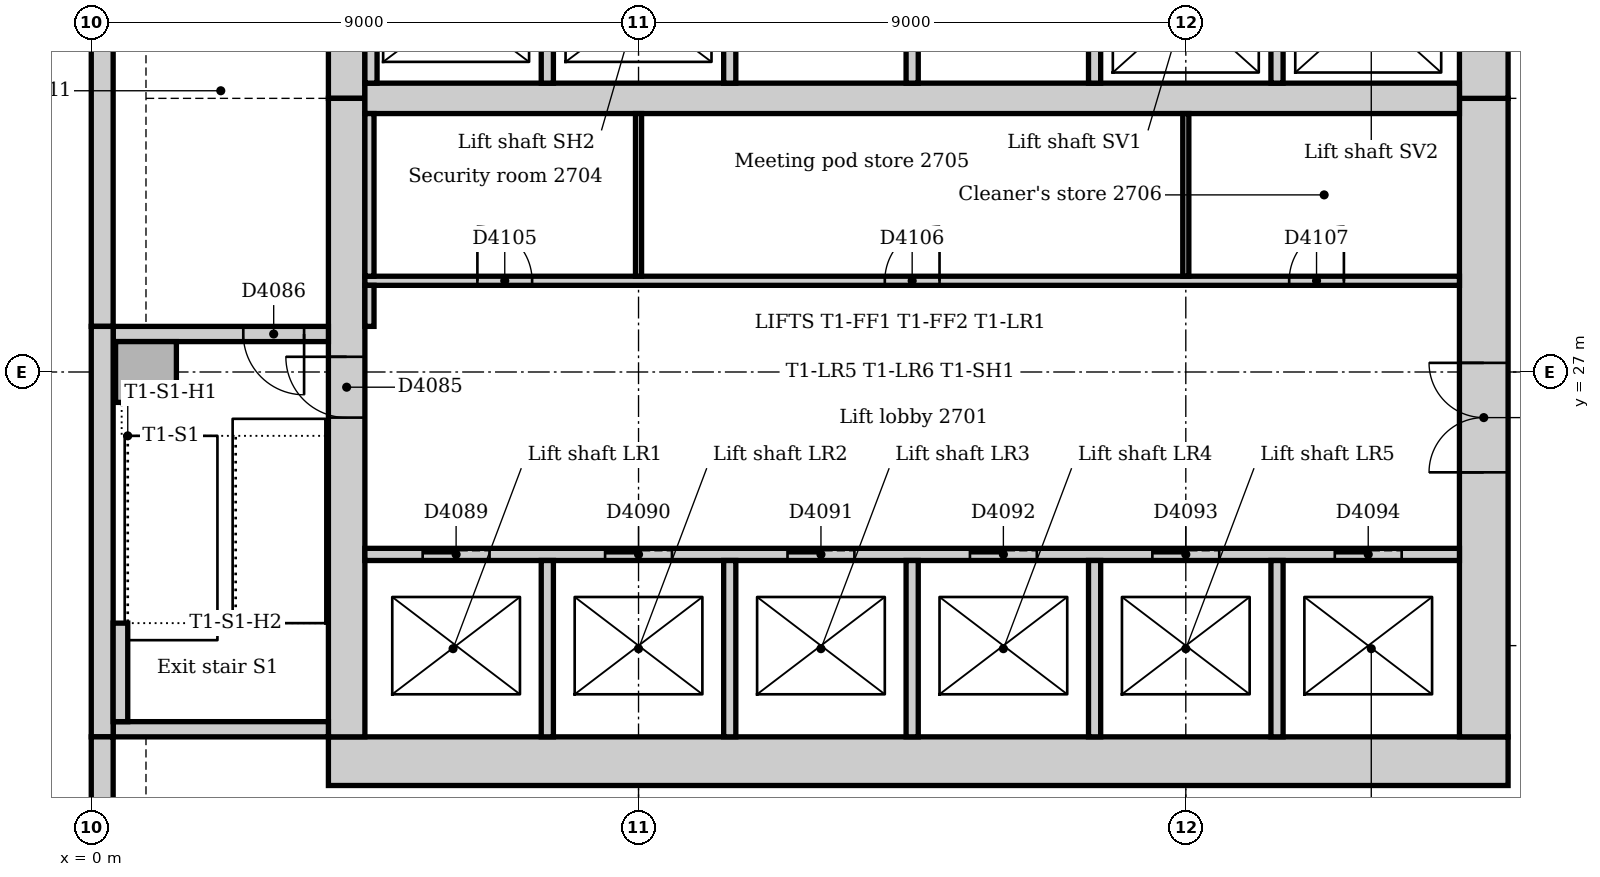
"""IFC4 building model, lengths in metres.
Left out: names, types, materials, properties, quantities, classifications, styles, units other than length and angle.
Written with IfcOpenShell. Run it as: python <this file> out.ifc"""

import sys

from ifc_helpers import new_model, si_unit, direction, frame, frame_2d, origin, origin_2d, place, context, subcontext, project, spatial, rectangle, extrude, element, fill, save


model = new_model("IFC4")
c1 = context("Model", 3, precision=1e-05, world=origin(), true_north=direction((0.0, 1.0)))
c2 = subcontext(c1, "Body", "Model", "MODEL_VIEW")
j1 = project(units=[si_unit("LENGTHUNIT", "METRE"), si_unit("PLANEANGLEUNIT", "RADIAN")], contexts=[c1])
p1 = place(None, origin())
s1 = spatial("IfcSite", under=j1, at=p1, CompositionType="ELEMENT")
p2 = place(p1, origin())
s2 = spatial("IfcBuilding", under=s1, at=p2, CompositionType="ELEMENT")
p3 = place(p2, frame((0.0, 0.0, 116.0)))
s3 = spatial("IfcBuildingStorey", under=s2, at=p3, CompositionType="ELEMENT", Elevation=116.0)
p4 = place(p3, frame((3.9, 20.6, 0.0), z_axis=(0.0, 0.0, 1.0), x_axis=(1.0, 0.0, 0.0)))
e1 = element("IfcWall", 1, at=p4, inside=s3, PredefinedType="SOLIDWALL", context=c2, shape_type="SweptSolid", body=[
    extrude(rectangle(XDim=19.4, YDim=0.8, at=frame_2d((9.7, 0.0))), origin(), (0.0, 0.0, 1.0), 4.0),
])
p5 = place(p3, frame((22.9, 21.0, 0.0), z_axis=(0.0, 0.0, 1.0), x_axis=(0.0, 1.0, 0.0)))
e2 = element("IfcWall", 2, at=p5, inside=s3, PredefinedType="SOLIDWALL", context=c2, shape_type="SweptSolid", body=[
    extrude(rectangle(XDim=10.5, YDim=0.8, at=frame_2d((5.25, 0.0))), origin(), (0.0, 0.0, 1.0), 4.0),
])
p6 = place(p5, frame((4.35, 0.0, 0.0)))
e3 = element("IfcOpeningElement", 3, at=p6, cuts=e2, PredefinedType="OPENING", context=c2, shape_type="SweptSolid", body=[
    extrude(rectangle(XDim=1.8, YDim=2.1, at=frame_2d((0.9, 1.05))), frame((0.0, 0.41, 0.0), z_axis=(0.0, -1.0, 0.0), x_axis=(1.0, 0.0, 0.0)), (0.0, 0.0, 1.0), 0.82),
])
p7 = place(p3, frame((22.9, 31.5, 0.0), z_axis=(0.0, 0.0, 1.0), x_axis=(0.0, 1.0, 0.0)))
e4 = element("IfcWall", 4, at=p7, inside=s3, PredefinedType="SOLIDWALL", context=c2, shape_type="SweptSolid", body=[
    extrude(rectangle(XDim=10.5, YDim=0.8, at=frame_2d((5.25, 0.0))), origin(), (0.0, 0.0, 1.0), 4.0),
])
p8 = place(p7, frame((3.15, 0.0, 0.0)))
e5 = element("IfcOpeningElement", 5, at=p8, cuts=e4, PredefinedType="OPENING", context=c2, shape_type="SweptSolid", body=[
    extrude(rectangle(XDim=1.0, YDim=2.1, at=frame_2d((0.5, 1.05))), frame((0.0, 0.41, 0.0), z_axis=(0.0, -1.0, 0.0), x_axis=(1.0, 0.0, 0.0)), (0.0, 0.0, 1.0), 0.82),
])
p9 = place(p7, frame((5.2, 0.0, 0.0)))
e6 = element("IfcOpeningElement", 6, at=p9, cuts=e4, PredefinedType="OPENING", context=c2, shape_type="SweptSolid", body=[
    extrude(rectangle(XDim=1.0, YDim=2.1, at=frame_2d((0.5, 1.05))), frame((0.0, 0.41, 0.0), z_axis=(0.0, -1.0, 0.0), x_axis=(1.0, 0.0, 0.0)), (0.0, 0.0, 1.0), 0.82),
])
p10 = place(p3, frame((4.2, 42.0, 0.0), z_axis=(0.0, 0.0, 1.0), x_axis=(0.0, -1.0, 0.0)))
e7 = element("IfcWall", 7, at=p10, inside=s3, PredefinedType="SOLIDWALL", context=c2, shape_type="SweptSolid", body=[
    extrude(rectangle(XDim=10.5, YDim=0.6, at=frame_2d((5.25, 0.0))), origin(), (0.0, 0.0, 1.0), 4.0),
])
p11 = place(p10, frame((5.3, 0.0, 0.0)))
e8 = element("IfcOpeningElement", 8, at=p11, cuts=e7, PredefinedType="OPENING", context=c2, shape_type="SweptSolid", body=[
    extrude(rectangle(XDim=1.0, YDim=2.1, at=frame_2d((0.5, 1.05))), frame((0.0, 0.31, 0.0), z_axis=(0.0, -1.0, 0.0), x_axis=(1.0, 0.0, 0.0)), (0.0, 0.0, 1.0), 0.62),
])
p12 = place(p3, frame((4.2, 31.5, 0.0), z_axis=(0.0, 0.0, 1.0), x_axis=(0.0, -1.0, 0.0)))
e9 = element("IfcWall", 9, at=p12, inside=s3, PredefinedType="SOLIDWALL", context=c2, shape_type="SweptSolid", body=[
    extrude(rectangle(XDim=10.5, YDim=0.6, at=frame_2d((5.25, 0.0))), origin(), (0.0, 0.0, 1.0), 4.0),
])
p13 = place(p12, frame((4.25, 0.0, 0.0)))
e10 = element("IfcOpeningElement", 10, at=p13, cuts=e9, PredefinedType="OPENING", context=c2, shape_type="SweptSolid", body=[
    extrude(rectangle(XDim=1.0, YDim=2.1, at=frame_2d((0.5, 1.05))), frame((0.0, 0.31, 0.0), z_axis=(0.0, -1.0, 0.0), x_axis=(1.0, 0.0, 0.0)), (0.0, 0.0, 1.0), 0.62),
])
p14 = place(p3, frame((4.5, 31.5, 0.0), z_axis=(0.0, 0.0, 1.0), x_axis=(1.0, 0.0, 0.0)))
e11 = element("IfcWall", 11, at=p14, inside=s3, PredefinedType="SOLIDWALL", context=c2, shape_type="SweptSolid", body=[
    extrude(rectangle(XDim=18.0, YDim=0.5, at=frame_2d((9.0, 0.0))), origin(), (0.0, 0.0, 1.0), 4.0),
])
p15 = place(p3, frame((0.36, 21.125, 0.0), z_axis=(0.0, 0.0, 1.0), x_axis=(1.0, 0.0, 0.0)))
e12 = element("IfcWall", 12, at=p15, inside=s3, PredefinedType="SOLIDWALL", context=c2, shape_type="SweptSolid", body=[
    extrude(rectangle(XDim=3.54, YDim=0.25, at=frame_2d((1.77, 0.0))), origin(), (0.0, 0.0, 1.0), 4.0),
])
p16 = place(p3, frame((3.9, 27.625, 0.0), z_axis=(0.0, 0.0, 1.0), x_axis=(-1.0, 0.0, 0.0)))
e13 = element("IfcWall", 13, at=p16, inside=s3, PredefinedType="SOLIDWALL", context=c2, shape_type="SweptSolid", body=[
    extrude(rectangle(XDim=3.54, YDim=0.25, at=frame_2d((1.77, 0.0))), origin(), (0.0, 0.0, 1.0), 4.0),
])
p17 = place(p16, frame((0.4, 0.0, 0.0)))
e14 = element("IfcOpeningElement", 14, at=p17, cuts=e13, PredefinedType="OPENING", context=c2, shape_type="SweptSolid", body=[
    extrude(rectangle(XDim=1.0, YDim=2.1, at=frame_2d((0.5, 1.05))), frame((0.0, 0.135, 0.0), z_axis=(0.0, -1.0, 0.0), x_axis=(1.0, 0.0, 0.0)), (0.0, 0.0, 1.0), 0.27),
])
p18 = place(p3, frame((0.9, 27.0, 0.0), z_axis=(0.0, 0.0, 1.0), x_axis=(1.0, 0.0, 0.0)))
e15 = element("IfcColumn", 15, at=p18, inside=s3, PredefinedType="COLUMN", context=c2, shape_type="SweptSolid", body=[
    extrude(rectangle(XDim=1.0, YDim=1.0, at=origin_2d()), origin(), (0.0, 0.0, 1.0), 4.0),
])
p19 = place(p3, frame((0.18, 35.25, 0.0), z_axis=(0.0, 0.0, 1.0), x_axis=(0.0, -1.0, 0.0)))
e16 = element("IfcWall", 16, at=p19, inside=s3, PredefinedType="STANDARD", context=c2, shape_type="SweptSolid", body=[
    extrude(rectangle(XDim=7.5, YDim=0.36, at=frame_2d((3.75, 0.0))), origin(), (0.0, 0.0, 1.0), 3.85),
])
p20 = place(p3, frame((0.18, 27.75, 0.0), z_axis=(0.0, 0.0, 1.0), x_axis=(0.0, -1.0, 0.0)))
e17 = element("IfcWall", 17, at=p20, inside=s3, PredefinedType="STANDARD", context=c2, shape_type="SweptSolid", body=[
    extrude(rectangle(XDim=6.75, YDim=0.36, at=frame_2d((3.375, 0.0))), origin(), (0.0, 0.0, 1.0), 3.85),
])
p21 = place(p3, frame((0.18, 21.0, 0.0), z_axis=(0.0, 0.0, 1.0), x_axis=(0.0, -1.0, 0.0)))
e18 = element("IfcWall", 18, at=p21, inside=s3, PredefinedType="STANDARD", context=c2, shape_type="SweptSolid", body=[
    extrude(rectangle(XDim=12.257, YDim=0.36, at=frame_2d((6.129, 0.0))), origin(), (0.0, 0.0, 1.0), 3.85),
])
p22 = place(p21, frame((1.35, 0.0, 0.9)))
e19 = element("IfcOpeningElement", 19, at=p22, cuts=e18, PredefinedType="OPENING", context=c2, shape_type="SweptSolid", body=[
    extrude(rectangle(XDim=3.3, YDim=1.6, at=frame_2d((1.65, 0.8))), frame((0.0, 0.19, 0.0), z_axis=(0.0, -1.0, 0.0), x_axis=(1.0, 0.0, 0.0)), (0.0, 0.0, 1.0), 0.38),
])
p23 = place(p21, frame((5.85, 0.0, 0.9)))
e20 = element("IfcOpeningElement", 20, at=p23, cuts=e18, PredefinedType="OPENING", context=c2, shape_type="SweptSolid", body=[
    extrude(rectangle(XDim=3.3, YDim=1.6, at=frame_2d((1.65, 0.8))), frame((0.0, 0.19, 0.0), z_axis=(0.0, -1.0, 0.0), x_axis=(1.0, 0.0, 0.0)), (0.0, 0.0, 1.0), 0.38),
])
p24 = place(p3, frame((0.48, 21.25, 0.0), z_axis=(0.0, 0.0, 1.0), x_axis=(0.0, 1.0, 0.0)))
e21 = element("IfcWall", 21, at=p24, inside=s3, PredefinedType="STANDARD", context=c2, shape_type="SweptSolid", body=[
    extrude(rectangle(XDim=1.62, YDim=0.24, at=frame_2d((0.81, 0.0))), origin(), (0.0, 0.0, 1.0), 4.0),
])
p25 = place(p3, frame((4.5, 24.0, 0.0), z_axis=(0.0, 0.0, 1.0), x_axis=(1.0, 0.0, 0.0)))
e22 = element("IfcWall", 22, at=p25, inside=s3, PredefinedType="PARTITIONING", context=c2, shape_type="SweptSolid", body=[
    extrude(rectangle(XDim=18.0, YDim=0.2, at=frame_2d((9.0, 0.0))), origin(), (0.0, 0.0, 1.0), 3.85),
])
p26 = place(p25, frame((0.95, 0.0, 0.0)))
e23 = element("IfcOpeningElement", 23, at=p26, cuts=e22, PredefinedType="OPENING", context=c2, shape_type="SweptSolid", body=[
    extrude(rectangle(XDim=1.1, YDim=2.1, at=frame_2d((0.55, 1.05))), frame((0.0, 0.11, 0.0), z_axis=(0.0, -1.0, 0.0), x_axis=(1.0, 0.0, 0.0)), (0.0, 0.0, 1.0), 0.22),
])
p27 = place(p25, frame((3.95, 0.0, 0.0)))
e24 = element("IfcOpeningElement", 24, at=p27, cuts=e22, PredefinedType="OPENING", context=c2, shape_type="SweptSolid", body=[
    extrude(rectangle(XDim=1.1, YDim=2.1, at=frame_2d((0.55, 1.05))), frame((0.0, 0.11, 0.0), z_axis=(0.0, -1.0, 0.0), x_axis=(1.0, 0.0, 0.0)), (0.0, 0.0, 1.0), 0.22),
])
p28 = place(p25, frame((6.95, 0.0, 0.0)))
e25 = element("IfcOpeningElement", 25, at=p28, cuts=e22, PredefinedType="OPENING", context=c2, shape_type="SweptSolid", body=[
    extrude(rectangle(XDim=1.1, YDim=2.1, at=frame_2d((0.55, 1.05))), frame((0.0, 0.11, 0.0), z_axis=(0.0, -1.0, 0.0), x_axis=(1.0, 0.0, 0.0)), (0.0, 0.0, 1.0), 0.22),
])
p29 = place(p25, frame((9.95, 0.0, 0.0)))
e26 = element("IfcOpeningElement", 26, at=p29, cuts=e22, PredefinedType="OPENING", context=c2, shape_type="SweptSolid", body=[
    extrude(rectangle(XDim=1.1, YDim=2.1, at=frame_2d((0.55, 1.05))), frame((0.0, 0.11, 0.0), z_axis=(0.0, -1.0, 0.0), x_axis=(1.0, 0.0, 0.0)), (0.0, 0.0, 1.0), 0.22),
])
p30 = place(p25, frame((12.95, 0.0, 0.0)))
e27 = element("IfcOpeningElement", 27, at=p30, cuts=e22, PredefinedType="OPENING", context=c2, shape_type="SweptSolid", body=[
    extrude(rectangle(XDim=1.1, YDim=2.1, at=frame_2d((0.55, 1.05))), frame((0.0, 0.11, 0.0), z_axis=(0.0, -1.0, 0.0), x_axis=(1.0, 0.0, 0.0)), (0.0, 0.0, 1.0), 0.22),
])
p31 = place(p25, frame((15.95, 0.0, 0.0)))
e28 = element("IfcOpeningElement", 28, at=p31, cuts=e22, PredefinedType="OPENING", context=c2, shape_type="SweptSolid", body=[
    extrude(rectangle(XDim=1.1, YDim=2.1, at=frame_2d((0.55, 1.05))), frame((0.0, 0.11, 0.0), z_axis=(0.0, -1.0, 0.0), x_axis=(1.0, 0.0, 0.0)), (0.0, 0.0, 1.0), 0.22),
])
p32 = place(p3, frame((4.6, 31.75, 0.0), z_axis=(0.0, 0.0, 1.0), x_axis=(0.0, 1.0, 0.0)))
e29 = element("IfcWall", 29, at=p32, inside=s3, PredefinedType="PARTITIONING", context=c2, shape_type="SweptSolid", body=[
    extrude(rectangle(XDim=2.65, YDim=0.2, at=frame_2d((1.325, 0.0))), origin(), (0.0, 0.0, 1.0), 3.85),
])
p33 = place(p3, frame((7.5, 21.0, 0.0), z_axis=(0.0, 0.0, 1.0), x_axis=(0.0, 1.0, 0.0)))
e30 = element("IfcWall", 30, at=p33, inside=s3, PredefinedType="PARTITIONING", context=c2, shape_type="SweptSolid", body=[
    extrude(rectangle(XDim=2.9, YDim=0.2, at=frame_2d((1.45, 0.0))), origin(), (0.0, 0.0, 1.0), 3.85),
])
p34 = place(p3, frame((7.5, 31.75, 0.0), z_axis=(0.0, 0.0, 1.0), x_axis=(0.0, 1.0, 0.0)))
e31 = element("IfcWall", 31, at=p34, inside=s3, PredefinedType="PARTITIONING", context=c2, shape_type="SweptSolid", body=[
    extrude(rectangle(XDim=2.65, YDim=0.2, at=frame_2d((1.325, 0.0))), origin(), (0.0, 0.0, 1.0), 3.85),
])
p35 = place(p3, frame((10.5, 21.0, 0.0), z_axis=(0.0, 0.0, 1.0), x_axis=(0.0, 1.0, 0.0)))
e32 = element("IfcWall", 32, at=p35, inside=s3, PredefinedType="PARTITIONING", context=c2, shape_type="SweptSolid", body=[
    extrude(rectangle(XDim=2.9, YDim=0.2, at=frame_2d((1.45, 0.0))), origin(), (0.0, 0.0, 1.0), 3.85),
])
p36 = place(p3, frame((10.5, 31.75, 0.0), z_axis=(0.0, 0.0, 1.0), x_axis=(0.0, 1.0, 0.0)))
e33 = element("IfcWall", 33, at=p36, inside=s3, PredefinedType="PARTITIONING", context=c2, shape_type="SweptSolid", body=[
    extrude(rectangle(XDim=2.65, YDim=0.2, at=frame_2d((1.325, 0.0))), origin(), (0.0, 0.0, 1.0), 3.85),
])
p37 = place(p3, frame((13.5, 21.0, 0.0), z_axis=(0.0, 0.0, 1.0), x_axis=(0.0, 1.0, 0.0)))
e34 = element("IfcWall", 34, at=p37, inside=s3, PredefinedType="PARTITIONING", context=c2, shape_type="SweptSolid", body=[
    extrude(rectangle(XDim=2.9, YDim=0.2, at=frame_2d((1.45, 0.0))), origin(), (0.0, 0.0, 1.0), 3.85),
])
p38 = place(p3, frame((13.5, 31.75, 0.0), z_axis=(0.0, 0.0, 1.0), x_axis=(0.0, 1.0, 0.0)))
e35 = element("IfcWall", 35, at=p38, inside=s3, PredefinedType="PARTITIONING", context=c2, shape_type="SweptSolid", body=[
    extrude(rectangle(XDim=2.65, YDim=0.2, at=frame_2d((1.325, 0.0))), origin(), (0.0, 0.0, 1.0), 3.85),
])
p39 = place(p3, frame((16.5, 21.0, 0.0), z_axis=(0.0, 0.0, 1.0), x_axis=(0.0, 1.0, 0.0)))
e36 = element("IfcWall", 36, at=p39, inside=s3, PredefinedType="PARTITIONING", context=c2, shape_type="SweptSolid", body=[
    extrude(rectangle(XDim=2.9, YDim=0.2, at=frame_2d((1.45, 0.0))), origin(), (0.0, 0.0, 1.0), 3.85),
])
p40 = place(p3, frame((16.5, 31.75, 0.0), z_axis=(0.0, 0.0, 1.0), x_axis=(0.0, 1.0, 0.0)))
e37 = element("IfcWall", 37, at=p40, inside=s3, PredefinedType="PARTITIONING", context=c2, shape_type="SweptSolid", body=[
    extrude(rectangle(XDim=2.65, YDim=0.2, at=frame_2d((1.325, 0.0))), origin(), (0.0, 0.0, 1.0), 3.85),
])
p41 = place(p3, frame((19.5, 21.0, 0.0), z_axis=(0.0, 0.0, 1.0), x_axis=(0.0, 1.0, 0.0)))
e38 = element("IfcWall", 38, at=p41, inside=s3, PredefinedType="PARTITIONING", context=c2, shape_type="SweptSolid", body=[
    extrude(rectangle(XDim=2.9, YDim=0.2, at=frame_2d((1.45, 0.0))), origin(), (0.0, 0.0, 1.0), 3.85),
])
p42 = place(p3, frame((19.5, 31.75, 0.0), z_axis=(0.0, 0.0, 1.0), x_axis=(0.0, 1.0, 0.0)))
e39 = element("IfcWall", 39, at=p42, inside=s3, PredefinedType="PARTITIONING", context=c2, shape_type="SweptSolid", body=[
    extrude(rectangle(XDim=2.65, YDim=0.2, at=frame_2d((1.325, 0.0))), origin(), (0.0, 0.0, 1.0), 3.85),
])
p43 = place(p3, frame((4.5, 28.5, 0.0), z_axis=(0.0, 0.0, 1.0), x_axis=(1.0, 0.0, 0.0)))
e40 = element("IfcWall", 40, at=p43, inside=s3, PredefinedType="PARTITIONING", context=c2, shape_type="SweptSolid", body=[
    extrude(rectangle(XDim=18.0, YDim=0.15, at=frame_2d((9.0, 0.0))), origin(), (0.0, 0.0, 1.0), 3.85),
])
p44 = place(p43, frame((1.85, 0.0, 0.0)))
e41 = element("IfcOpeningElement", 41, at=p44, cuts=e40, PredefinedType="OPENING", context=c2, shape_type="SweptSolid", body=[
    extrude(rectangle(XDim=0.9, YDim=2.1, at=frame_2d((0.45, 1.05))), frame((0.0, 0.085, 0.0), z_axis=(0.0, -1.0, 0.0), x_axis=(1.0, 0.0, 0.0)), (0.0, 0.0, 1.0), 0.17),
])
p45 = place(p43, frame((8.55, 0.0, 0.0)))
e42 = element("IfcOpeningElement", 42, at=p45, cuts=e40, PredefinedType="OPENING", context=c2, shape_type="SweptSolid", body=[
    extrude(rectangle(XDim=0.9, YDim=2.1, at=frame_2d((0.45, 1.05))), frame((0.0, 0.085, 0.0), z_axis=(0.0, -1.0, 0.0), x_axis=(1.0, 0.0, 0.0)), (0.0, 0.0, 1.0), 0.17),
])
p46 = place(p43, frame((15.2, 0.0, 0.0)))
e43 = element("IfcOpeningElement", 43, at=p46, cuts=e40, PredefinedType="OPENING", context=c2, shape_type="SweptSolid", body=[
    extrude(rectangle(XDim=0.9, YDim=2.1, at=frame_2d((0.45, 1.05))), frame((0.0, 0.085, 0.0), z_axis=(0.0, -1.0, 0.0), x_axis=(1.0, 0.0, 0.0)), (0.0, 0.0, 1.0), 0.17),
])
p47 = place(p3, frame((4.575, 27.75, 0.0), z_axis=(0.0, 0.0, 1.0), x_axis=(0.0, 1.0, 0.0)))
e44 = element("IfcWall", 44, at=p47, inside=s3, PredefinedType="PARTITIONING", context=c2, shape_type="SweptSolid", body=[
    extrude(rectangle(XDim=0.675, YDim=0.15, at=frame_2d((0.338, 0.0))), origin(), (0.0, 0.0, 1.0), 3.85),
])
p48 = place(p3, frame((4.575, 28.575, 0.0), z_axis=(0.0, 0.0, 1.0), x_axis=(0.0, 1.0, 0.0)))
e45 = element("IfcWall", 45, at=p48, inside=s3, PredefinedType="PARTITIONING", context=c2, shape_type="SweptSolid", body=[
    extrude(rectangle(XDim=2.675, YDim=0.15, at=frame_2d((1.337, 0.0))), origin(), (0.0, 0.0, 1.0), 3.85),
])
for number, where, z_axis, x_axis in (
    (46, (9.0, 28.575, 0.0), (0.0, 0.0, 1.0), (0.0, 1.0, 0.0)),
    (47, (18.0, 28.575, 0.0), (0.0, 0.0, 1.0), (0.0, 1.0, 0.0)),
):
    element("IfcWall", number, at=place(p3, frame(where, z_axis=z_axis, x_axis=x_axis)), inside=s3, PredefinedType="PARTITIONING", context=c2, shape_type="SweptSolid", body=[
        extrude(rectangle(XDim=2.675, YDim=0.1, at=frame_2d((1.337, 0.0))), origin(), (0.0, 0.0, 1.0), 3.85),
    ])
p49 = place(p13, frame((1.0, 0.0, 0.0), z_axis=(0.0, 0.0, 1.0), x_axis=(-1.0, 0.0, 0.0)))
e48 = element("IfcDoor", 48, at=p49, inside=s3, OperationType="SINGLE_SWING_RIGHT", PredefinedType="DOOR", context=c2, shape_type="SweptSolid", body=[
    extrude(rectangle(XDim=1.0, YDim=2.1, at=frame_2d((0.5, 1.05))), frame((0.0, 0.025, 0.0), z_axis=(0.0, -1.0, 0.0), x_axis=(1.0, 0.0, 0.0)), (0.0, 0.0, 1.0), 0.05),
])
fill(e10, e48)
p50 = place(p17, origin())
e49 = element("IfcDoor", 49, at=p50, inside=s3, OperationType="SINGLE_SWING_LEFT", PredefinedType="DOOR", context=c2, shape_type="SweptSolid", body=[
    extrude(rectangle(XDim=1.0, YDim=2.1, at=frame_2d((0.5, 1.05))), frame((0.0, 0.025, 0.0), z_axis=(0.0, -1.0, 0.0), x_axis=(1.0, 0.0, 0.0)), (0.0, 0.0, 1.0), 0.05),
])
fill(e14, e49)
p51 = place(p26, origin())
e50 = element("IfcDoor", 50, at=p51, inside=s3, OperationType="SLIDING_TO_LEFT", PredefinedType="DOOR", context=c2, shape_type="SweptSolid", body=[
    extrude(rectangle(XDim=1.1, YDim=2.1, at=frame_2d((0.55, 1.05))), frame((0.0, 0.025, 0.0), z_axis=(0.0, -1.0, 0.0), x_axis=(1.0, 0.0, 0.0)), (0.0, 0.0, 1.0), 0.05),
])
fill(e23, e50)
p52 = place(p27, origin())
e51 = element("IfcDoor", 51, at=p52, inside=s3, OperationType="SLIDING_TO_LEFT", PredefinedType="DOOR", context=c2, shape_type="SweptSolid", body=[
    extrude(rectangle(XDim=1.1, YDim=2.1, at=frame_2d((0.55, 1.05))), frame((0.0, 0.025, 0.0), z_axis=(0.0, -1.0, 0.0), x_axis=(1.0, 0.0, 0.0)), (0.0, 0.0, 1.0), 0.05),
])
fill(e24, e51)
p53 = place(p28, origin())
e52 = element("IfcDoor", 52, at=p53, inside=s3, OperationType="SLIDING_TO_LEFT", PredefinedType="DOOR", context=c2, shape_type="SweptSolid", body=[
    extrude(rectangle(XDim=1.1, YDim=2.1, at=frame_2d((0.55, 1.05))), frame((0.0, 0.025, 0.0), z_axis=(0.0, -1.0, 0.0), x_axis=(1.0, 0.0, 0.0)), (0.0, 0.0, 1.0), 0.05),
])
fill(e25, e52)
p54 = place(p29, origin())
e53 = element("IfcDoor", 53, at=p54, inside=s3, OperationType="SLIDING_TO_LEFT", PredefinedType="DOOR", context=c2, shape_type="SweptSolid", body=[
    extrude(rectangle(XDim=1.1, YDim=2.1, at=frame_2d((0.55, 1.05))), frame((0.0, 0.025, 0.0), z_axis=(0.0, -1.0, 0.0), x_axis=(1.0, 0.0, 0.0)), (0.0, 0.0, 1.0), 0.05),
])
fill(e26, e53)
p55 = place(p30, origin())
e54 = element("IfcDoor", 54, at=p55, inside=s3, OperationType="SLIDING_TO_LEFT", PredefinedType="DOOR", context=c2, shape_type="SweptSolid", body=[
    extrude(rectangle(XDim=1.1, YDim=2.1, at=frame_2d((0.55, 1.05))), frame((0.0, 0.025, 0.0), z_axis=(0.0, -1.0, 0.0), x_axis=(1.0, 0.0, 0.0)), (0.0, 0.0, 1.0), 0.05),
])
fill(e27, e54)
p56 = place(p31, origin())
e55 = element("IfcDoor", 55, at=p56, inside=s3, OperationType="SLIDING_TO_LEFT", PredefinedType="DOOR", context=c2, shape_type="SweptSolid", body=[
    extrude(rectangle(XDim=1.1, YDim=2.1, at=frame_2d((0.55, 1.05))), frame((0.0, 0.025, 0.0), z_axis=(0.0, -1.0, 0.0), x_axis=(1.0, 0.0, 0.0)), (0.0, 0.0, 1.0), 0.05),
])
fill(e28, e55)
p57 = place(p6, origin())
e56 = element("IfcDoor", 56, at=p57, inside=s3, OperationType="DOUBLE_DOOR_DOUBLE_SWING", PredefinedType="DOOR", context=c2, shape_type="SweptSolid", body=[
    extrude(rectangle(XDim=1.8, YDim=2.1, at=frame_2d((0.9, 1.05))), frame((0.0, 0.025, 0.0), z_axis=(0.0, -1.0, 0.0), x_axis=(1.0, 0.0, 0.0)), (0.0, 0.0, 1.0), 0.05),
])
fill(e3, e56)
p58 = place(p44, origin())
e57 = element("IfcDoor", 57, at=p58, inside=s3, OperationType="SINGLE_SWING_LEFT", PredefinedType="DOOR", context=c2, shape_type="SweptSolid", body=[
    extrude(rectangle(XDim=0.9, YDim=2.1, at=frame_2d((0.45, 1.05))), frame((0.0, 0.025, 0.0), z_axis=(0.0, -1.0, 0.0), x_axis=(1.0, 0.0, 0.0)), (0.0, 0.0, 1.0), 0.05),
])
fill(e41, e57)
p59 = place(p45, origin())
e58 = element("IfcDoor", 58, at=p59, inside=s3, OperationType="SINGLE_SWING_RIGHT", PredefinedType="DOOR", context=c2, shape_type="SweptSolid", body=[
    extrude(rectangle(XDim=0.9, YDim=2.1, at=frame_2d((0.45, 1.05))), frame((0.0, 0.025, 0.0), z_axis=(0.0, -1.0, 0.0), x_axis=(1.0, 0.0, 0.0)), (0.0, 0.0, 1.0), 0.05),
])
fill(e42, e58)
p60 = place(p46, origin())
e59 = element("IfcDoor", 59, at=p60, inside=s3, OperationType="SINGLE_SWING_RIGHT", PredefinedType="DOOR", context=c2, shape_type="SweptSolid", body=[
    extrude(rectangle(XDim=0.9, YDim=2.1, at=frame_2d((0.45, 1.05))), frame((0.0, 0.025, 0.0), z_axis=(0.0, -1.0, 0.0), x_axis=(1.0, 0.0, 0.0)), (0.0, 0.0, 1.0), 0.05),
])
fill(e43, e59)
save(model, sys.argv[1])
